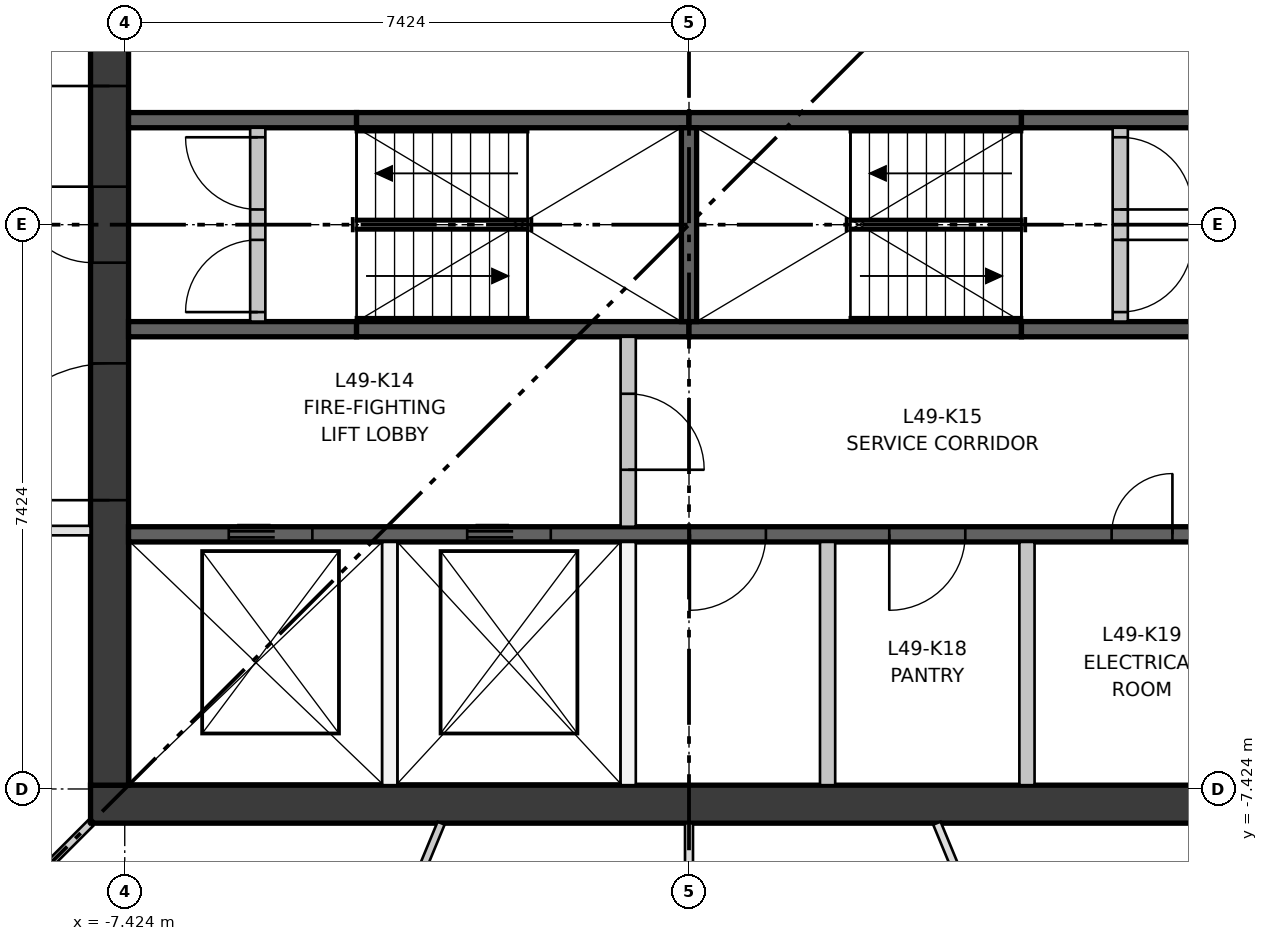
"""IFC4 building model, lengths in metres.
Left out: names, types, materials, properties, quantities, classifications, styles, units other than length and angle.
Written with IfcOpenShell. Run it as: python <this file> out.ifc"""

import sys

from ifc_helpers import new_model, si_unit, direction, frame, frame_2d, origin, place, context, subcontext, project, spatial, rectangle, extrude, element, fill, save


model = new_model("IFC4")
c1 = context("Model", 3, precision=1e-05, world=origin(), true_north=direction((0.0, 1.0)))
c2 = subcontext(c1, "Body", "Model", "MODEL_VIEW")
j1 = project(units=[si_unit("LENGTHUNIT", "METRE"), si_unit("PLANEANGLEUNIT", "RADIAN")], contexts=[c1])
p1 = place(None, origin())
s1 = spatial("IfcSite", under=j1, at=p1, CompositionType="ELEMENT")
p2 = place(p1, origin())
s2 = spatial("IfcBuilding", under=s1, at=p2, CompositionType="ELEMENT")
p3 = place(p2, frame((0.0, 0.0, 184.3)))
s3 = spatial("IfcBuildingStorey", under=s2, at=p3, CompositionType="ELEMENT", Elevation=184.3)
p4 = place(p3, frame((-7.874, -7.624, 0.0), z_axis=(0.0, 0.0, 1.0), x_axis=(1.0, 0.0, 0.0)))
e1 = element("IfcWall", 1, at=p4, inside=s3, PredefinedType="SHEAR", context=c2, shape_type="SweptSolid", body=[
    extrude(rectangle(XDim=15.748, YDim=0.5, at=frame_2d((7.874, 0.0))), origin(), (0.0, 0.0, 1.0), 3.35),
])
p5 = place(p3, frame((-7.624, -7.374, 0.0), z_axis=(0.0, 0.0, 1.0), x_axis=(0.0, 1.0, 0.0)))
e2 = element("IfcWall", 2, at=p5, inside=s3, PredefinedType="SHEAR", context=c2, shape_type="SweptSolid", body=[
    extrude(rectangle(XDim=14.748, YDim=0.5, at=frame_2d((7.374, 0.0))), origin(), (0.0, 0.0, 1.0), 3.35),
])
p6 = place(p5, frame((6.874, 0.0, 0.0)))
e3 = element("IfcOpeningElement", 3, at=p6, cuts=e2, PredefinedType="OPENING", context=c2, shape_type="SweptSolid", body=[
    extrude(rectangle(XDim=1.0, YDim=2.1, at=frame_2d((0.5, 1.05))), frame((0.0, 0.26, 0.0), z_axis=(0.0, -1.0, 0.0), x_axis=(1.0, 0.0, 0.0)), (0.0, 0.0, 1.0), 0.52),
])
p7 = place(p5, frame((3.75, 0.0, 0.0)))
e4 = element("IfcOpeningElement", 4, at=p7, cuts=e2, PredefinedType="OPENING", context=c2, shape_type="SweptSolid", body=[
    extrude(rectangle(XDim=1.8, YDim=2.1, at=frame_2d((0.9, 1.05))), frame((0.0, 0.26, 0.0), z_axis=(0.0, -1.0, 0.0), x_axis=(1.0, 0.0, 0.0)), (0.0, 0.0, 1.0), 0.52),
])
p8 = place(p5, frame((9.198, 0.0, 0.0)))
e5 = element("IfcOpeningElement", 5, at=p8, cuts=e2, PredefinedType="OPENING", context=c2, shape_type="SweptSolid", body=[
    extrude(rectangle(XDim=1.8, YDim=2.1, at=frame_2d((0.9, 1.05))), frame((0.0, 0.26, 0.0), z_axis=(0.0, -1.0, 0.0), x_axis=(1.0, 0.0, 0.0)), (0.0, 0.0, 1.0), 0.52),
])
p9 = place(p3, frame((-7.374, -4.074, 0.0), z_axis=(0.0, 0.0, 1.0), x_axis=(1.0, 0.0, 0.0)))
e6 = element("IfcWall", 6, at=p9, inside=s3, PredefinedType="SHEAR", context=c2, shape_type="SweptSolid", body=[
    extrude(rectangle(XDim=14.748, YDim=0.2, at=frame_2d((7.374, 0.0))), origin(), (0.0, 0.0, 1.0), 3.0),
])
p10 = place(p9, frame((1.319, 0.0, 0.0)))
e7 = element("IfcOpeningElement", 7, at=p10, cuts=e6, PredefinedType="OPENING", context=c2, shape_type="SweptSolid", body=[
    extrude(rectangle(XDim=1.1, YDim=2.1, at=frame_2d((0.55, 1.05))), frame((0.0, 0.11, 0.0), z_axis=(0.0, -1.0, 0.0), x_axis=(1.0, 0.0, 0.0)), (0.0, 0.0, 1.0), 0.22),
])
p11 = place(p9, frame((4.456, 0.0, 0.0)))
e8 = element("IfcOpeningElement", 8, at=p11, cuts=e6, PredefinedType="OPENING", context=c2, shape_type="SweptSolid", body=[
    extrude(rectangle(XDim=1.1, YDim=2.1, at=frame_2d((0.55, 1.05))), frame((0.0, 0.11, 0.0), z_axis=(0.0, -1.0, 0.0), x_axis=(1.0, 0.0, 0.0)), (0.0, 0.0, 1.0), 0.22),
])
p12 = place(p9, frame((7.386, 0.0, 0.0)))
e9 = element("IfcOpeningElement", 9, at=p12, cuts=e6, PredefinedType="OPENING", context=c2, shape_type="SweptSolid", body=[
    extrude(rectangle(XDim=1.0, YDim=2.1, at=frame_2d((0.5, 1.05))), frame((0.0, 0.11, 0.0), z_axis=(0.0, -1.0, 0.0), x_axis=(1.0, 0.0, 0.0)), (0.0, 0.0, 1.0), 0.22),
])
p13 = place(p9, frame((10.009, 0.0, 0.0)))
e10 = element("IfcOpeningElement", 10, at=p13, cuts=e6, PredefinedType="OPENING", context=c2, shape_type="SweptSolid", body=[
    extrude(rectangle(XDim=1.0, YDim=2.1, at=frame_2d((0.5, 1.05))), frame((0.0, 0.11, 0.0), z_axis=(0.0, -1.0, 0.0), x_axis=(1.0, 0.0, 0.0)), (0.0, 0.0, 1.0), 0.22),
])
p14 = place(p9, frame((12.934, 0.0, 0.0)))
e11 = element("IfcOpeningElement", 11, at=p14, cuts=e6, PredefinedType="OPENING", context=c2, shape_type="SweptSolid", body=[
    extrude(rectangle(XDim=0.8, YDim=2.1, at=frame_2d((0.4, 1.05))), frame((0.0, 0.11, 0.0), z_axis=(0.0, -1.0, 0.0), x_axis=(1.0, 0.0, 0.0)), (0.0, 0.0, 1.0), 0.22),
])
p15 = place(p3, frame((-7.374, -1.375, 0.0), z_axis=(0.0, 0.0, 1.0), x_axis=(1.0, 0.0, 0.0)))
e12 = element("IfcWall", 12, at=p15, inside=s3, PredefinedType="SHEAR", context=c2, shape_type="SweptSolid", body=[
    extrude(rectangle(XDim=3.0, YDim=0.2, at=frame_2d((1.5, 0.0))), origin(), (0.0, 0.0, 1.0), 3.0),
])
for number, where, z_axis, x_axis in (
    (13, (-4.374, -1.375, 0.0), (0.0, 0.0, 1.0), (1.0, 0.0, 0.0)),
    (14, (0.0, -1.375, 0.0), (0.0, 0.0, 1.0), (1.0, 0.0, 0.0)),
):
    element("IfcWall", number, at=place(p3, frame(where, z_axis=z_axis, x_axis=x_axis)), inside=s3, PredefinedType="SHEAR", context=c2, shape_type="SweptSolid", body=[
        extrude(rectangle(XDim=4.374, YDim=0.2, at=frame_2d((2.187, 0.0))), origin(), (0.0, 0.0, 1.0), 3.0),
    ])
for number, where, z_axis, x_axis in (
    (15, (4.374, -1.375, 0.0), (0.0, 0.0, 1.0), (1.0, 0.0, 0.0)),
    (16, (-7.374, 1.375, 0.0), (0.0, 0.0, 1.0), (1.0, 0.0, 0.0)),
):
    element("IfcWall", number, at=place(p3, frame(where, z_axis=z_axis, x_axis=x_axis)), inside=s3, PredefinedType="SHEAR", context=c2, shape_type="SweptSolid", body=[
        extrude(rectangle(XDim=3.0, YDim=0.2, at=frame_2d((1.5, 0.0))), origin(), (0.0, 0.0, 1.0), 3.0),
    ])
for number, where, z_axis, x_axis in (
    (17, (-4.374, 1.375, 0.0), (0.0, 0.0, 1.0), (1.0, 0.0, 0.0)),
    (18, (0.0, 1.375, 0.0), (0.0, 0.0, 1.0), (1.0, 0.0, 0.0)),
):
    element("IfcWall", number, at=place(p3, frame(where, z_axis=z_axis, x_axis=x_axis)), inside=s3, PredefinedType="SHEAR", context=c2, shape_type="SweptSolid", body=[
        extrude(rectangle(XDim=4.374, YDim=0.2, at=frame_2d((2.187, 0.0))), origin(), (0.0, 0.0, 1.0), 3.0),
    ])
p16 = place(p3, frame((4.374, 1.375, 0.0), z_axis=(0.0, 0.0, 1.0), x_axis=(1.0, 0.0, 0.0)))
e19 = element("IfcWall", 19, at=p16, inside=s3, PredefinedType="SHEAR", context=c2, shape_type="SweptSolid", body=[
    extrude(rectangle(XDim=3.0, YDim=0.2, at=frame_2d((1.5, 0.0))), origin(), (0.0, 0.0, 1.0), 3.0),
])
p17 = place(p3, frame((0.0, -1.275, 0.0), z_axis=(0.0, 0.0, 1.0), x_axis=(0.0, 1.0, 0.0)))
e20 = element("IfcWall", 20, at=p17, inside=s3, PredefinedType="SHEAR", context=c2, shape_type="SweptSolid", body=[
    extrude(rectangle(XDim=2.55, YDim=0.2, at=frame_2d((1.275, 0.0))), origin(), (0.0, 0.0, 1.0), 3.0),
])
for number, where, z_axis, x_axis in (
    (21, (-3.937, -7.374, 0.0), (0.0, 0.0, 1.0), (0.0, 1.0, 0.0)),
    (22, (-0.8, -7.374, 0.0), (0.0, 0.0, 1.0), (0.0, 1.0, 0.0)),
):
    element("IfcWall", number, at=place(p3, frame(where, z_axis=z_axis, x_axis=x_axis)), inside=s3, PredefinedType="PARTITIONING", context=c2, shape_type="SweptSolid", body=[
        extrude(rectangle(XDim=3.2, YDim=0.2, at=frame_2d((1.6, 0.0))), origin(), (0.0, 0.0, 1.0), 3.0),
    ])
p18 = place(p3, frame((-0.8, -3.974, 0.0), z_axis=(0.0, 0.0, 1.0), x_axis=(0.0, 1.0, 0.0)))
e23 = element("IfcWall", 23, at=p18, inside=s3, PredefinedType="PARTITIONING", context=c2, shape_type="SweptSolid", body=[
    extrude(rectangle(XDim=2.499, YDim=0.2, at=frame_2d((1.25, 0.0))), origin(), (0.0, 0.0, 1.0), 3.0),
])
p19 = place(p18, frame((0.75, 0.0, 0.0)))
e24 = element("IfcOpeningElement", 24, at=p19, cuts=e23, PredefinedType="OPENING", context=c2, shape_type="SweptSolid", body=[
    extrude(rectangle(XDim=1.0, YDim=2.1, at=frame_2d((0.5, 1.05))), frame((0.0, 0.11, 0.0), z_axis=(0.0, -1.0, 0.0), x_axis=(1.0, 0.0, 0.0)), (0.0, 0.0, 1.0), 0.22),
])
for number, where, z_axis, x_axis in (
    (25, (1.823, -7.374, 0.0), (0.0, 0.0, 1.0), (0.0, 1.0, 0.0)),
    (26, (4.447, -7.374, 0.0), (0.0, 0.0, 1.0), (0.0, 1.0, 0.0)),
):
    element("IfcWall", number, at=place(p3, frame(where, z_axis=z_axis, x_axis=x_axis)), inside=s3, PredefinedType="PARTITIONING", context=c2, shape_type="SweptSolid", body=[
        extrude(rectangle(XDim=3.2, YDim=0.2, at=frame_2d((1.6, 0.0))), origin(), (0.0, 0.0, 1.0), 3.0),
    ])
p20 = place(p3, frame((-5.674, -1.275, 0.0), z_axis=(0.0, 0.0, 1.0), x_axis=(0.0, 1.0, 0.0)))
e27 = element("IfcWall", 27, at=p20, inside=s3, PredefinedType="PARTITIONING", context=c2, shape_type="SweptSolid", body=[
    extrude(rectangle(XDim=2.55, YDim=0.2, at=frame_2d((1.275, 0.0))), origin(), (0.0, 0.0, 1.0), 3.0),
])
p21 = place(p20, frame((0.125, 0.0, 0.0)))
e28 = element("IfcOpeningElement", 28, at=p21, cuts=e27, PredefinedType="OPENING", context=c2, shape_type="SweptSolid", body=[
    extrude(rectangle(XDim=0.95, YDim=2.1, at=frame_2d((0.475, 1.05))), frame((0.0, 0.11, 0.0), z_axis=(0.0, -1.0, 0.0), x_axis=(1.0, 0.0, 0.0)), (0.0, 0.0, 1.0), 0.22),
])
p22 = place(p20, frame((1.475, 0.0, 0.0)))
e29 = element("IfcOpeningElement", 29, at=p22, cuts=e27, PredefinedType="OPENING", context=c2, shape_type="SweptSolid", body=[
    extrude(rectangle(XDim=0.95, YDim=2.1, at=frame_2d((0.475, 1.05))), frame((0.0, 0.11, 0.0), z_axis=(0.0, -1.0, 0.0), x_axis=(1.0, 0.0, 0.0)), (0.0, 0.0, 1.0), 0.22),
])
p23 = place(p3, frame((5.674, -1.275, 0.0), z_axis=(0.0, 0.0, 1.0), x_axis=(0.0, 1.0, 0.0)))
e30 = element("IfcWall", 30, at=p23, inside=s3, PredefinedType="PARTITIONING", context=c2, shape_type="SweptSolid", body=[
    extrude(rectangle(XDim=2.55, YDim=0.2, at=frame_2d((1.275, 0.0))), origin(), (0.0, 0.0, 1.0), 3.0),
])
p24 = place(p23, frame((0.125, 0.0, 0.0)))
e31 = element("IfcOpeningElement", 31, at=p24, cuts=e30, PredefinedType="OPENING", context=c2, shape_type="SweptSolid", body=[
    extrude(rectangle(XDim=0.95, YDim=2.1, at=frame_2d((0.475, 1.05))), frame((0.0, 0.11, 0.0), z_axis=(0.0, -1.0, 0.0), x_axis=(1.0, 0.0, 0.0)), (0.0, 0.0, 1.0), 0.22),
])
p25 = place(p23, frame((1.475, 0.0, 0.0)))
e32 = element("IfcOpeningElement", 32, at=p25, cuts=e30, PredefinedType="OPENING", context=c2, shape_type="SweptSolid", body=[
    extrude(rectangle(XDim=0.95, YDim=2.1, at=frame_2d((0.475, 1.05))), frame((0.0, 0.11, 0.0), z_axis=(0.0, -1.0, 0.0), x_axis=(1.0, 0.0, 0.0)), (0.0, 0.0, 1.0), 0.22),
])
p26 = place(p3, frame((-7.874, -4.024, 0.0), z_axis=(0.0, 0.0, 1.0), x_axis=(-1.0, 0.0, 0.0)))
e33 = element("IfcWall", 33, at=p26, inside=s3, PredefinedType="PARTITIONING", context=c2, shape_type="SweptSolid", body=[
    extrude(rectangle(XDim=5.499, YDim=0.125, at=frame_2d((2.75, 0.0))), origin(), (0.0, 0.0, 1.0), 3.0),
])
p27 = place(p26, frame((2.2, 0.0, 0.0)))
e34 = element("IfcOpeningElement", 34, at=p27, cuts=e33, PredefinedType="OPENING", context=c2, shape_type="SweptSolid", body=[
    extrude(rectangle(XDim=1.0, YDim=2.1, at=frame_2d((0.5, 1.05))), frame((0.0, 0.073, 0.0), z_axis=(0.0, -1.0, 0.0), x_axis=(1.0, 0.0, 0.0)), (0.0, 0.0, 1.0), 0.145),
])
p28 = place(p3, frame((-7.874, -7.874, 0.0), z_axis=(0.0, 0.0, 1.0), x_axis=(-0.707106781187, -0.707106781187, 0.0)))
e35 = element("IfcWall", 35, at=p28, inside=s3, PredefinedType="PARTITIONING", context=c2, shape_type="SweptSolid", body=[
    extrude(rectangle(XDim=5.834, YDim=0.1, at=frame_2d((2.917, 0.0))), origin(), (0.0, 0.0, 1.0), 3.0),
])
p29 = place(p28, frame((1.8, 0.0, 0.0)))
e36 = element("IfcOpeningElement", 36, at=p29, cuts=e35, PredefinedType="OPENING", context=c2, shape_type="SweptSolid", body=[
    extrude(rectangle(XDim=1.0, YDim=2.1, at=frame_2d((0.5, 1.05))), frame((0.0, 0.06, 0.0), z_axis=(0.0, -1.0, 0.0), x_axis=(1.0, 0.0, 0.0)), (0.0, 0.0, 1.0), 0.12),
])
p30 = place(p3, frame((-3.261, -7.874, 0.0), z_axis=(0.0, 0.0, 1.0), x_axis=(-0.382669328176, -0.923885374532, 0.0)))
e37 = element("IfcWall", 37, at=p30, inside=s3, PredefinedType="PARTITIONING", context=c2, shape_type="SweptSolid", body=[
    extrude(rectangle(XDim=6.247, YDim=0.1, at=frame_2d((3.124, 0.0))), origin(), (0.0, 0.0, 1.0), 3.0),
])
p31 = place(p30, frame((2.6, 0.0, 0.0)))
e38 = element("IfcOpeningElement", 38, at=p31, cuts=e37, PredefinedType="OPENING", context=c2, shape_type="SweptSolid", body=[
    extrude(rectangle(XDim=1.0, YDim=2.1, at=frame_2d((0.5, 1.05))), frame((0.0, 0.06, 0.0), z_axis=(0.0, -1.0, 0.0), x_axis=(1.0, 0.0, 0.0)), (0.0, 0.0, 1.0), 0.12),
])
p32 = place(p3, frame((0.0, -7.874, 0.0), z_axis=(0.0, 0.0, 1.0), x_axis=(0.0, -1.0, 0.0)))
e39 = element("IfcWall", 39, at=p32, inside=s3, PredefinedType="PARTITIONING", context=c2, shape_type="SweptSolid", body=[
    extrude(rectangle(XDim=6.896, YDim=0.105, at=frame_2d((3.448, 0.0))), origin(), (0.0, 0.0, 1.0), 3.0),
])
p33 = place(p32, frame((2.9, 0.0, 0.0)))
e40 = element("IfcOpeningElement", 40, at=p33, cuts=e39, PredefinedType="OPENING", context=c2, shape_type="SweptSolid", body=[
    extrude(rectangle(XDim=1.0, YDim=2.1, at=frame_2d((0.5, 1.05))), frame((0.0, 0.062, 0.0), z_axis=(0.0, -1.0, 0.0), x_axis=(1.0, 0.0, 0.0)), (0.0, 0.0, 1.0), 0.125),
])
p34 = place(p3, frame((3.261, -7.874, 0.0), z_axis=(0.0, 0.0, 1.0), x_axis=(0.382669328176, -0.923885374532, 0.0)))
e41 = element("IfcWall", 41, at=p34, inside=s3, PredefinedType="PARTITIONING", context=c2, shape_type="SweptSolid", body=[
    extrude(rectangle(XDim=6.247, YDim=0.105, at=frame_2d((3.124, 0.0))), origin(), (0.0, 0.0, 1.0), 3.0),
])
p35 = place(p10, origin())
e42 = element("IfcDoor", 42, at=p35, inside=s3, OperationType="DOUBLE_DOOR_SLIDING", PredefinedType="DOOR", context=c2, shape_type="SweptSolid", body=[
    extrude(rectangle(XDim=1.1, YDim=2.1, at=frame_2d((0.55, 1.05))), frame((0.0, 0.025, 0.0), z_axis=(0.0, -1.0, 0.0), x_axis=(1.0, 0.0, 0.0)), (0.0, 0.0, 1.0), 0.05),
])
fill(e7, e42)
p36 = place(p11, origin())
e43 = element("IfcDoor", 43, at=p36, inside=s3, OperationType="DOUBLE_DOOR_SLIDING", PredefinedType="DOOR", context=c2, shape_type="SweptSolid", body=[
    extrude(rectangle(XDim=1.1, YDim=2.1, at=frame_2d((0.55, 1.05))), frame((0.0, 0.025, 0.0), z_axis=(0.0, -1.0, 0.0), x_axis=(1.0, 0.0, 0.0)), (0.0, 0.0, 1.0), 0.05),
])
fill(e8, e43)
p37 = place(p21, origin())
e44 = element("IfcDoor", 44, at=p37, inside=s3, OperationType="SINGLE_SWING_LEFT", PredefinedType="DOOR", context=c2, shape_type="SweptSolid", body=[
    extrude(rectangle(XDim=0.95, YDim=2.1, at=frame_2d((0.475, 1.05))), frame((0.0, 0.025, 0.0), z_axis=(0.0, -1.0, 0.0), x_axis=(1.0, 0.0, 0.0)), (0.0, 0.0, 1.0), 0.05),
])
fill(e28, e44)
p38 = place(p22, origin())
e45 = element("IfcDoor", 45, at=p38, inside=s3, OperationType="SINGLE_SWING_RIGHT", PredefinedType="DOOR", context=c2, shape_type="SweptSolid", body=[
    extrude(rectangle(XDim=0.95, YDim=2.1, at=frame_2d((0.475, 1.05))), frame((0.0, 0.025, 0.0), z_axis=(0.0, -1.0, 0.0), x_axis=(1.0, 0.0, 0.0)), (0.0, 0.0, 1.0), 0.05),
])
fill(e29, e45)
p39 = place(p24, frame((0.95, 0.0, 0.0), z_axis=(0.0, 0.0, 1.0), x_axis=(-1.0, 0.0, 0.0)))
e46 = element("IfcDoor", 46, at=p39, inside=s3, OperationType="SINGLE_SWING_RIGHT", PredefinedType="DOOR", context=c2, shape_type="SweptSolid", body=[
    extrude(rectangle(XDim=0.95, YDim=2.1, at=frame_2d((0.475, 1.05))), frame((0.0, 0.025, 0.0), z_axis=(0.0, -1.0, 0.0), x_axis=(1.0, 0.0, 0.0)), (0.0, 0.0, 1.0), 0.05),
])
fill(e31, e46)
p40 = place(p25, frame((0.95, 0.0, 0.0), z_axis=(0.0, 0.0, 1.0), x_axis=(-1.0, 0.0, 0.0)))
e47 = element("IfcDoor", 47, at=p40, inside=s3, OperationType="SINGLE_SWING_LEFT", PredefinedType="DOOR", context=c2, shape_type="SweptSolid", body=[
    extrude(rectangle(XDim=0.95, YDim=2.1, at=frame_2d((0.475, 1.05))), frame((0.0, 0.025, 0.0), z_axis=(0.0, -1.0, 0.0), x_axis=(1.0, 0.0, 0.0)), (0.0, 0.0, 1.0), 0.05),
])
fill(e32, e47)
p41 = place(p19, frame((1.0, 0.0, 0.0), z_axis=(0.0, 0.0, 1.0), x_axis=(-1.0, 0.0, 0.0)))
e48 = element("IfcDoor", 48, at=p41, inside=s3, OperationType="SINGLE_SWING_LEFT", PredefinedType="DOOR", context=c2, shape_type="SweptSolid", body=[
    extrude(rectangle(XDim=1.0, YDim=2.1, at=frame_2d((0.5, 1.05))), frame((0.0, 0.025, 0.0), z_axis=(0.0, -1.0, 0.0), x_axis=(1.0, 0.0, 0.0)), (0.0, 0.0, 1.0), 0.05),
])
fill(e24, e48)
p42 = place(p12, frame((1.0, 0.0, 0.0), z_axis=(0.0, 0.0, 1.0), x_axis=(-1.0, 0.0, 0.0)))
e49 = element("IfcDoor", 49, at=p42, inside=s3, OperationType="SINGLE_SWING_LEFT", PredefinedType="DOOR", context=c2, shape_type="SweptSolid", body=[
    extrude(rectangle(XDim=1.0, YDim=2.1, at=frame_2d((0.5, 1.05))), frame((0.0, 0.025, 0.0), z_axis=(0.0, -1.0, 0.0), x_axis=(1.0, 0.0, 0.0)), (0.0, 0.0, 1.0), 0.05),
])
fill(e9, e49)
p43 = place(p13, frame((1.0, 0.0, 0.0), z_axis=(0.0, 0.0, 1.0), x_axis=(-1.0, 0.0, 0.0)))
e50 = element("IfcDoor", 50, at=p43, inside=s3, OperationType="SINGLE_SWING_LEFT", PredefinedType="DOOR", context=c2, shape_type="SweptSolid", body=[
    extrude(rectangle(XDim=1.0, YDim=2.1, at=frame_2d((0.5, 1.05))), frame((0.0, 0.025, 0.0), z_axis=(0.0, -1.0, 0.0), x_axis=(1.0, 0.0, 0.0)), (0.0, 0.0, 1.0), 0.05),
])
fill(e10, e50)
p44 = place(p14, origin())
e51 = element("IfcDoor", 51, at=p44, inside=s3, OperationType="SINGLE_SWING_RIGHT", PredefinedType="DOOR", context=c2, shape_type="SweptSolid", body=[
    extrude(rectangle(XDim=0.8, YDim=2.1, at=frame_2d((0.4, 1.05))), frame((0.0, 0.025, 0.0), z_axis=(0.0, -1.0, 0.0), x_axis=(1.0, 0.0, 0.0)), (0.0, 0.0, 1.0), 0.05),
])
fill(e11, e51)
p45 = place(p6, origin())
e52 = element("IfcDoor", 52, at=p45, inside=s3, OperationType="SINGLE_SWING_RIGHT", PredefinedType="DOOR", context=c2, shape_type="SweptSolid", body=[
    extrude(rectangle(XDim=1.0, YDim=2.1, at=frame_2d((0.5, 1.05))), frame((0.0, 0.25, 0.0), z_axis=(0.0, -1.0, 0.0), x_axis=(1.0, 0.0, 0.0)), (0.0, 0.0, 1.0), 0.05),
])
fill(e3, e52)
p46 = place(p7, origin())
e53 = element("IfcDoor", 53, at=p46, inside=s3, OperationType="DOUBLE_DOOR_SINGLE_SWING", PredefinedType="DOOR", context=c2, shape_type="SweptSolid", body=[
    extrude(rectangle(XDim=1.8, YDim=2.1, at=frame_2d((0.9, 1.05))), frame((0.0, 0.025, 0.0), z_axis=(0.0, -1.0, 0.0), x_axis=(1.0, 0.0, 0.0)), (0.0, 0.0, 1.0), 0.05),
])
fill(e4, e53)
p47 = place(p8, origin())
e54 = element("IfcDoor", 54, at=p47, inside=s3, OperationType="DOUBLE_DOOR_SINGLE_SWING", PredefinedType="DOOR", context=c2, shape_type="SweptSolid", body=[
    extrude(rectangle(XDim=1.8, YDim=2.1, at=frame_2d((0.9, 1.05))), frame((0.0, 0.025, 0.0), z_axis=(0.0, -1.0, 0.0), x_axis=(1.0, 0.0, 0.0)), (0.0, 0.0, 1.0), 0.05),
])
fill(e5, e54)
save(model, sys.argv[1])
